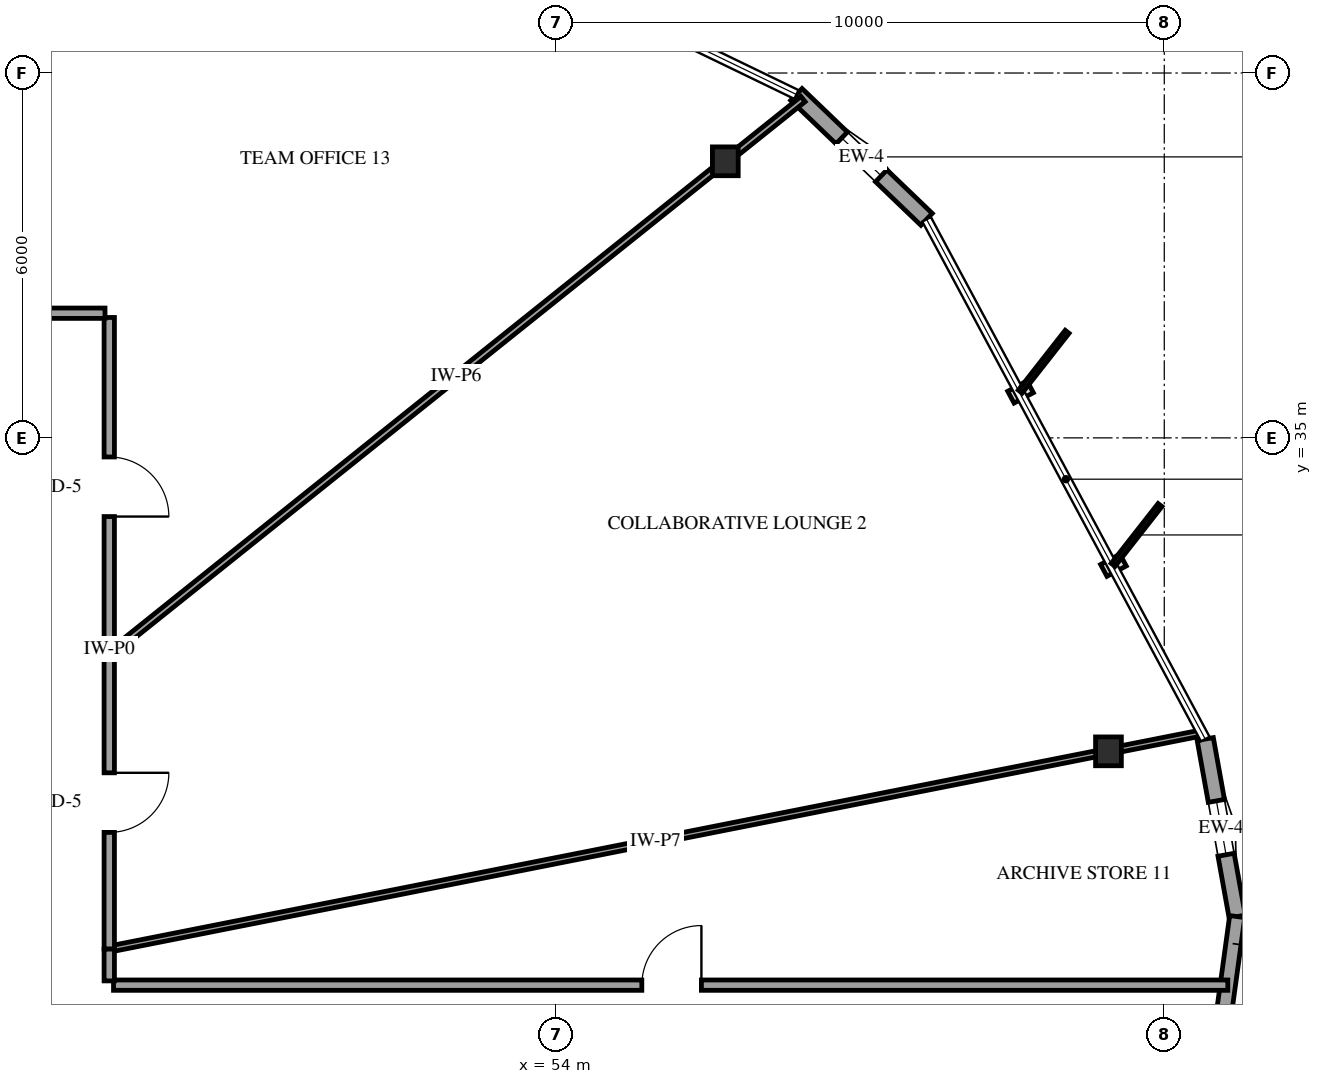
"""IFC4 building model, lengths in metres.
Left out: names, types, materials, properties, quantities, classifications, styles, units other than length and angle.
Written with IfcOpenShell. Run it as: python <this file> out.ifc"""

import sys

from ifc_helpers import new_model, si_unit, direction, frame, frame_2d, origin, origin_2d, place, context, subcontext, project, spatial, rectangle, i_section, extrude, element, fill, save


model = new_model("IFC4")
c1 = context("Model", 3, precision=1e-05, world=origin(), true_north=direction((0.0, 1.0)))
c2 = subcontext(c1, "Body", "Model", "MODEL_VIEW")
j1 = project(units=[si_unit("LENGTHUNIT", "METRE"), si_unit("PLANEANGLEUNIT", "RADIAN")], contexts=[c1])
p1 = place(None, origin())
s1 = spatial("IfcSite", under=j1, at=p1, CompositionType="ELEMENT")
p2 = place(p1, origin())
s2 = spatial("IfcBuilding", under=s1, at=p2, CompositionType="ELEMENT")
p3 = place(p2, frame((0.0, 0.0, 66.6)))
s3 = spatial("IfcBuildingStorey", under=s2, at=p3, CompositionType="ELEMENT", Elevation=66.6)
for number, where, z_axis, x_axis in (
    (1, (63.082, 29.845, 0.0), (0.0, 0.0, 1.0), (1.0, 0.0, 0.0)),
    (2, (56.781, 39.548, 0.0), (0.0, 0.0, 1.0), (1.0, 0.0, 0.0)),
):
    element("IfcColumn", number, at=place(p3, frame(where, z_axis=z_axis, x_axis=x_axis)), inside=s3, PredefinedType="COLUMN", context=c2, shape_type="SweptSolid", body=[
        extrude(i_section(OverallWidth=0.424, OverallDepth=0.474, WebThickness=0.048, FlangeThickness=0.077, FilletRadius=0.038, at=origin_2d()), origin(), (0.0, 0.0, 1.0), 4.0),
    ])
p4 = place(p3, frame((60.091, 38.594, 0.0), z_axis=(0.0, 0.0, 1.0), x_axis=(-0.721765475307, 0.69213770209, 0.0)))
e3 = element("IfcWall", 3, at=p4, inside=s3, PredefinedType="SOLIDWALL", context=c2, shape_type="SweptSolid", body=[
    extrude(rectangle(XDim=2.967, YDim=0.27, at=frame_2d((1.483, 0.0))), origin(), (0.0, 0.0, 1.0), 3.079),
])
p5 = place(p4, frame((1.033, 0.0, 0.75)))
e4 = element("IfcOpeningElement", 4, at=p5, cuts=e3, PredefinedType="OPENING", context=c2, shape_type="SweptSolid", body=[
    extrude(rectangle(XDim=0.9, YDim=1.5, at=frame_2d((0.45, 0.75))), frame((0.0, 0.145, 0.0), z_axis=(0.0, -1.0, 0.0), x_axis=(1.0, 0.0, 0.0)), (0.0, 0.0, 1.0), 0.29),
])
p6 = place(p3, frame((65.199, 27.127, 0.0), z_axis=(0.0, 0.0, 1.0), x_axis=(-0.177089231547, 0.984194799859, 0.0)))
e5 = element("IfcWall", 5, at=p6, inside=s3, PredefinedType="SOLIDWALL", context=c2, shape_type="SweptSolid", body=[
    extrude(rectangle(XDim=2.967, YDim=0.27, at=frame_2d((1.483, 0.0))), origin(), (0.0, 0.0, 1.0), 3.079),
])
p7 = place(p6, frame((1.033, 0.0, 0.75)))
e6 = element("IfcOpeningElement", 6, at=p7, cuts=e5, PredefinedType="OPENING", context=c2, shape_type="SweptSolid", body=[
    extrude(rectangle(XDim=0.9, YDim=1.5, at=frame_2d((0.45, 0.75))), frame((0.0, 0.145, 0.0), z_axis=(0.0, -1.0, 0.0), x_axis=(1.0, 0.0, 0.0)), (0.0, 0.0, 1.0), 0.29),
])
p8 = place(p3, frame((63.883, 17.519, 0.0), z_axis=(0.0, 0.0, 1.0), x_axis=(0.13571645175, 0.99074772002, 0.0)))
e7 = element("IfcWall", 7, at=p8, inside=s3, PredefinedType="SOLIDWALL", context=c2, shape_type="SweptSolid", body=[
    extrude(rectangle(XDim=9.698, YDim=0.25, at=frame_2d((4.849, 0.0))), origin(), (0.0, 0.0, 1.0), 3.079),
])
p9 = place(p8, frame((4.349, 0.0, 0.0)))
e8 = element("IfcOpeningElement", 8, at=p9, cuts=e7, PredefinedType="OPENING", context=c2, shape_type="SweptSolid", body=[
    extrude(rectangle(XDim=1.05, YDim=2.15, at=frame_2d((0.525, 1.075))), frame((0.0, 0.135, 0.0), z_axis=(0.0, -1.0, 0.0), x_axis=(1.0, 0.0, 0.0)), (0.0, 0.0, 1.0), 0.27),
])
p10 = place(p8, frame((0.81, 0.0, 0.72)))
e9 = element("IfcOpeningElement", 9, at=p10, cuts=e7, PredefinedType="OPENING", context=c2, shape_type="SweptSolid", body=[
    extrude(rectangle(XDim=1.05, YDim=1.55, at=frame_2d((0.525, 0.775))), frame((0.0, 0.135, 0.0), z_axis=(0.0, -1.0, 0.0), x_axis=(1.0, 0.0, 0.0)), (0.0, 0.0, 1.0), 0.27),
])
p11 = place(p8, frame((6.943, 0.0, 0.72)))
e10 = element("IfcOpeningElement", 10, at=p11, cuts=e7, PredefinedType="OPENING", context=c2, shape_type="SweptSolid", body=[
    extrude(rectangle(XDim=1.05, YDim=1.55, at=frame_2d((0.525, 0.775))), frame((0.0, 0.135, 0.0), z_axis=(0.0, -1.0, 0.0), x_axis=(1.0, 0.0, 0.0)), (0.0, 0.0, 1.0), 0.27),
])
p12 = place(p3, frame((46.72, 26.0, 0.0), z_axis=(0.0, 0.0, 1.0), x_axis=(1.0, 0.0, 0.0)))
e11 = element("IfcWall", 11, at=p12, inside=s3, PredefinedType="PARTITIONING", context=c2, shape_type="SweptSolid", body=[
    extrude(rectangle(XDim=18.325, YDim=0.17, at=frame_2d((9.163, 0.0))), origin(), (0.0, 0.0, 1.0), 3.7),
])
p13 = place(p12, frame((8.688, 0.0, 0.0)))
e12 = element("IfcOpeningElement", 12, at=p13, cuts=e11, PredefinedType="OPENING", context=c2, shape_type="SweptSolid", body=[
    extrude(rectangle(XDim=0.98, YDim=2.15, at=frame_2d((0.49, 1.075))), frame((0.0, 0.095, 0.0), z_axis=(0.0, -1.0, 0.0), x_axis=(1.0, 0.0, 0.0)), (0.0, 0.0, 1.0), 0.19),
])
p14 = place(p3, frame((46.65, 26.593, 0.0), z_axis=(0.0, 0.0, 1.0), x_axis=(0.980976457062, 0.194126738728, 0.0)))
e13 = element("IfcWall", 13, at=p14, inside=s3, PredefinedType="PARTITIONING", context=c2, shape_type="SweptSolid", body=[
    extrude(rectangle(XDim=18.317, YDim=0.1, at=frame_2d((9.159, 0.0))), origin(), (0.0, 0.0, 1.0), 2.995),
])
p15 = place(p3, frame((46.65, 31.442, 0.0), z_axis=(0.0, 0.0, 1.0), x_axis=(0.780808493208, 0.624770435387, 0.0)))
e14 = element("IfcWall", 14, at=p15, inside=s3, PredefinedType="PARTITIONING", context=c2, shape_type="SweptSolid", body=[
    extrude(rectangle(XDim=14.612, YDim=0.11, at=frame_2d((7.306, 0.0))), origin(), (0.0, 0.0, 1.0), 3.7),
])
p16 = place(p3, frame((43.357, 37.05, 0.0), z_axis=(0.0, 0.0, 1.0), x_axis=(0.367122541211, 0.930172585994, 0.0)))
e15 = element("IfcWall", 15, at=p16, inside=s3, PredefinedType="PARTITIONING", context=c2, shape_type="SweptSolid", body=[
    extrude(rectangle(XDim=8.845, YDim=0.14, at=frame_2d((4.422, 0.0))), origin(), (0.0, 0.0, 1.0), 2.995),
])
p17 = place(p3, frame((46.65, 36.98, 0.0), z_axis=(0.0, 0.0, 1.0), x_axis=(0.0, -1.0, 0.0)))
e16 = element("IfcWall", 16, at=p17, inside=s3, PredefinedType="PARTITIONING", context=c2, shape_type="SweptSolid", body=[
    extrude(rectangle(XDim=5.538, YDim=0.17, at=frame_2d((2.769, 0.0))), origin(), (0.0, 0.0, 1.0), 3.7),
])
p18 = place(p17, frame((2.294, 0.0, 0.0)))
e17 = element("IfcOpeningElement", 17, at=p18, cuts=e16, PredefinedType="OPENING", context=c2, shape_type="SweptSolid", body=[
    extrude(rectangle(XDim=0.98, YDim=2.15, at=frame_2d((0.49, 1.075))), frame((0.0, 0.095, 0.0), z_axis=(0.0, -1.0, 0.0), x_axis=(1.0, 0.0, 0.0)), (0.0, 0.0, 1.0), 0.19),
])
p19 = place(p3, frame((46.65, 31.442, 0.0), z_axis=(0.0, 0.0, 1.0), x_axis=(0.0, -1.0, 0.0)))
e18 = element("IfcWall", 18, at=p19, inside=s3, PredefinedType="PARTITIONING", context=c2, shape_type="SweptSolid", body=[
    extrude(rectangle(XDim=4.849, YDim=0.17, at=frame_2d((2.424, 0.0))), origin(), (0.0, 0.0, 1.0), 3.7),
])
p20 = place(p19, frame((1.95, 0.0, 0.0)))
e19 = element("IfcOpeningElement", 19, at=p20, cuts=e18, PredefinedType="OPENING", context=c2, shape_type="SweptSolid", body=[
    extrude(rectangle(XDim=0.98, YDim=2.15, at=frame_2d((0.49, 1.075))), frame((0.0, 0.095, 0.0), z_axis=(0.0, -1.0, 0.0), x_axis=(1.0, 0.0, 0.0)), (0.0, 0.0, 1.0), 0.19),
])
p21 = place(p3, frame((43.357, 37.05, 0.0), z_axis=(0.0, 0.0, 1.0), x_axis=(1.0, 0.0, 0.0)))
e20 = element("IfcWall", 20, at=p21, inside=s3, PredefinedType="PARTITIONING", context=c2, shape_type="SweptSolid", body=[
    extrude(rectangle(XDim=3.223, YDim=0.17, at=frame_2d((1.612, 0.0))), origin(), (0.0, 0.0, 1.0), 3.7),
])
p22 = place(p3, frame((46.65, 26.593, 0.0), z_axis=(0.0, 0.0, 1.0), x_axis=(0.0, -1.0, 0.0)))
e21 = element("IfcWall", 21, at=p22, inside=s3, PredefinedType="PARTITIONING", context=c2, shape_type="SweptSolid", body=[
    extrude(rectangle(XDim=0.523, YDim=0.17, at=frame_2d((0.261, 0.0))), origin(), (0.0, 0.0, 1.0), 3.7),
])
p23 = place(p5, origin())
e22 = element("IfcWindow", 22, at=p23, inside=s3, PartitioningType="SINGLE_PANEL", PredefinedType="WINDOW", context=c2, shape_type="SweptSolid", body=[
    extrude(rectangle(XDim=0.9, YDim=1.5, at=frame_2d((0.45, 0.75))), frame((0.0, 0.03, 0.0), z_axis=(0.0, -1.0, 0.0), x_axis=(1.0, 0.0, 0.0)), (0.0, 0.0, 1.0), 0.06),
])
fill(e4, e22)
p24 = place(p7, origin())
e23 = element("IfcWindow", 23, at=p24, inside=s3, PartitioningType="SINGLE_PANEL", PredefinedType="WINDOW", context=c2, shape_type="SweptSolid", body=[
    extrude(rectangle(XDim=0.9, YDim=1.5, at=frame_2d((0.45, 0.75))), frame((0.0, 0.03, 0.0), z_axis=(0.0, -1.0, 0.0), x_axis=(1.0, 0.0, 0.0)), (0.0, 0.0, 1.0), 0.06),
])
fill(e6, e23)
p25 = place(p13, origin())
e24 = element("IfcDoor", 24, at=p25, inside=s3, OperationType="SINGLE_SWING_RIGHT", PredefinedType="DOOR", context=c2, shape_type="SweptSolid", body=[
    extrude(rectangle(XDim=0.98, YDim=2.15, at=frame_2d((0.49, 1.075))), frame((0.0, 0.025, 0.0), z_axis=(0.0, -1.0, 0.0), x_axis=(1.0, 0.0, 0.0)), (0.0, 0.0, 1.0), 0.05),
])
fill(e12, e24)
p26 = place(p18, origin())
e25 = element("IfcDoor", 25, at=p26, inside=s3, OperationType="SINGLE_SWING_RIGHT", PredefinedType="DOOR", context=c2, shape_type="SweptSolid", body=[
    extrude(rectangle(XDim=0.98, YDim=2.15, at=frame_2d((0.49, 1.075))), frame((0.0, 0.025, 0.0), z_axis=(0.0, -1.0, 0.0), x_axis=(1.0, 0.0, 0.0)), (0.0, 0.0, 1.0), 0.05),
])
fill(e17, e25)
p27 = place(p20, origin())
e26 = element("IfcDoor", 26, at=p27, inside=s3, OperationType="SINGLE_SWING_LEFT", PredefinedType="DOOR", context=c2, shape_type="SweptSolid", body=[
    extrude(rectangle(XDim=0.98, YDim=2.15, at=frame_2d((0.49, 1.075))), frame((0.0, 0.025, 0.0), z_axis=(0.0, -1.0, 0.0), x_axis=(1.0, 0.0, 0.0)), (0.0, 0.0, 1.0), 0.05),
])
fill(e19, e26)
save(model, sys.argv[1])
